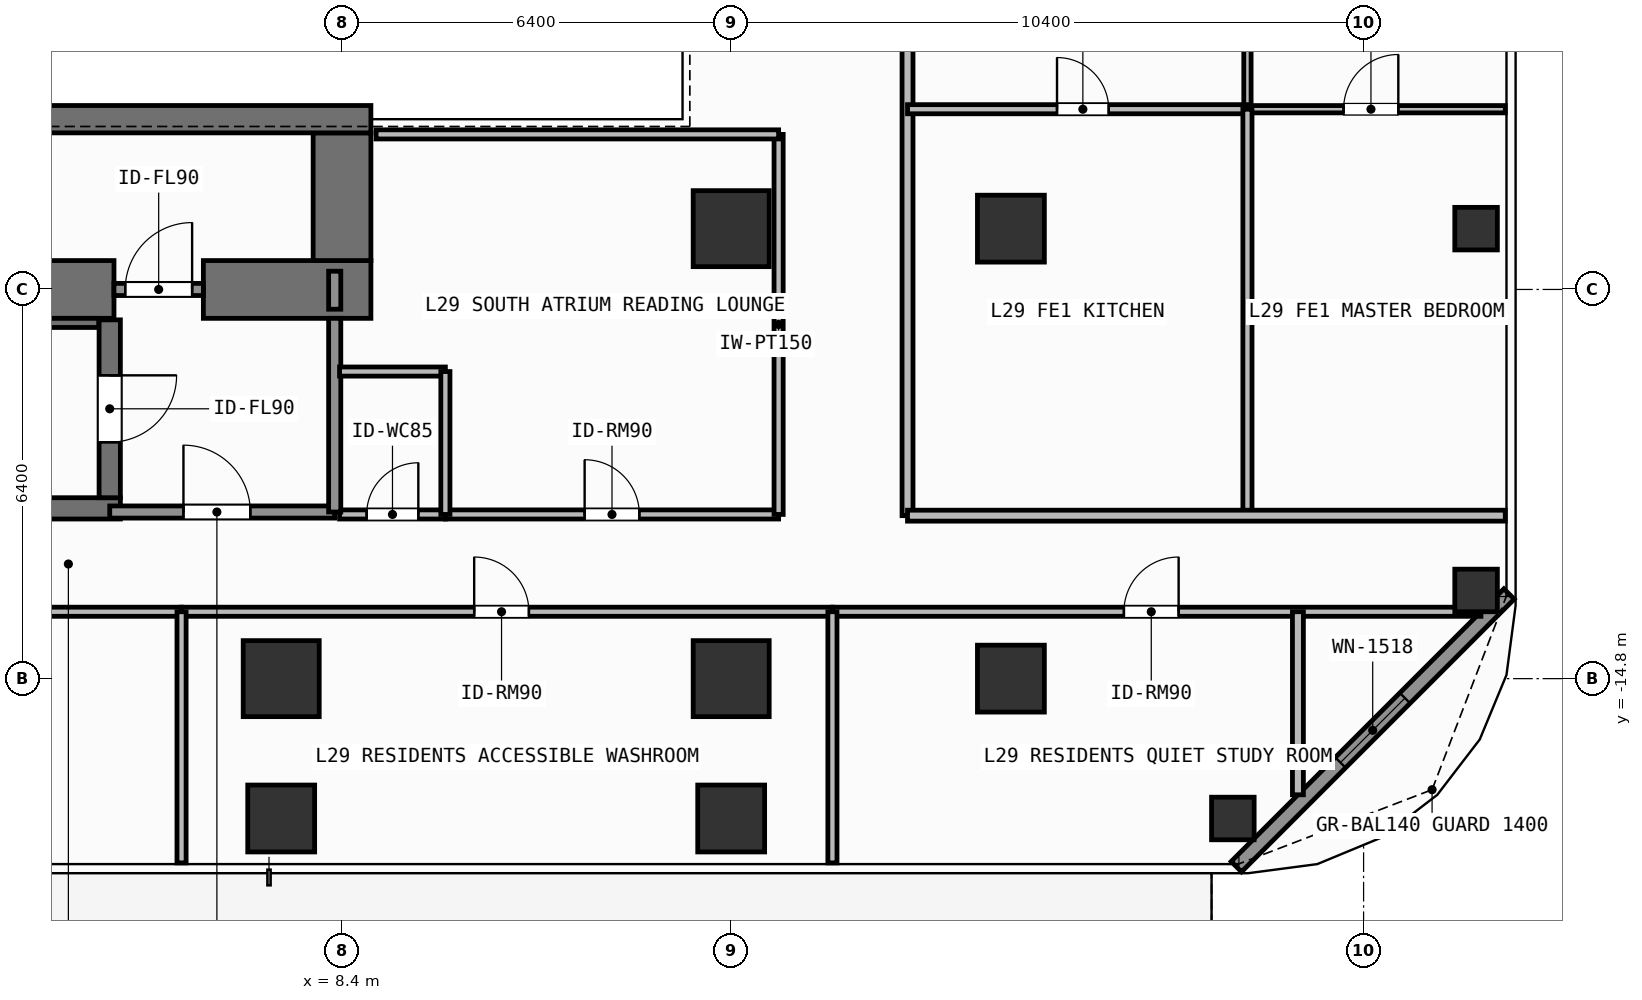
"""IFC4 building model, lengths in metres.
Left out: names, types, materials, properties, quantities, classifications, styles, units other than length and angle.
Written with IfcOpenShell. Run it as: python <this file> out.ifc"""

import sys

from ifc_helpers import new_model, si_unit, direction, frame, frame_2d, origin, origin_2d, place, context, subcontext, project, spatial, rectangle, hollow_rectangle, extrude, element, fill, save


model = new_model("IFC4")
c1 = context("Model", 3, precision=1e-05, world=origin(), true_north=direction((0.0, 1.0)))
c2 = subcontext(c1, "Body", "Model", "MODEL_VIEW")
j1 = project(units=[si_unit("LENGTHUNIT", "METRE"), si_unit("PLANEANGLEUNIT", "RADIAN")], contexts=[c1])
p1 = place(None, origin())
s1 = spatial("IfcSite", under=j1, at=p1, CompositionType="ELEMENT")
p2 = place(p1, origin())
s2 = spatial("IfcBuilding", under=s1, at=p2, CompositionType="ELEMENT")
p3 = place(p2, frame((0.0, 0.0, 117.3)))
s3 = spatial("IfcBuildingStorey", under=s2, at=p3, CompositionType="ELEMENT", Elevation=117.3)
p4 = place(p3, frame((-2.62, -8.4, 0.0), z_axis=(0.0, 0.0, 1.0), x_axis=(1.0, 0.0, 0.0)))
e1 = element("IfcWall", 1, at=p4, inside=s3, PredefinedType="SHEAR", context=c2, shape_type="SweptSolid", body=[
    extrude(rectangle(XDim=7.27, YDim=0.95, at=frame_2d((3.635, 0.0))), origin(), (0.0, 0.0, 1.0), 3.9),
])
p5 = place(p3, frame((6.12, -8.4, 0.0), z_axis=(0.0, 0.0, 1.0), x_axis=(1.0, 0.0, 0.0)))
e2 = element("IfcWall", 2, at=p5, inside=s3, PredefinedType="SHEAR", context=c2, shape_type="SweptSolid", body=[
    extrude(rectangle(XDim=2.755, YDim=0.95, at=frame_2d((1.377, 0.0))), origin(), (0.0, 0.0, 1.0), 3.9),
])
p6 = place(p3, frame((8.4, -7.925, 0.0), z_axis=(0.0, 0.0, 1.0), x_axis=(0.0, 1.0, 0.0)))
e3 = element("IfcWall", 3, at=p6, inside=s3, PredefinedType="SHEAR", context=c2, shape_type="SweptSolid", body=[
    extrude(rectangle(XDim=2.1, YDim=0.95, at=frame_2d((1.05, 0.0))), origin(), (0.0, 0.0, 1.0), 3.9),
])
p7 = place(p3, frame((3.045, -5.6, 0.0), z_axis=(0.0, 0.0, 1.0), x_axis=(1.0, 0.0, 0.0)))
e4 = element("IfcWall", 4, at=p7, inside=s3, PredefinedType="SHEAR", context=c2, shape_type="SweptSolid", body=[
    extrude(rectangle(XDim=5.83, YDim=0.45, at=frame_2d((2.915, 0.0))), origin(), (0.0, 0.0, 1.0), 3.9),
])
p8 = place(p3, frame((-2.555, -12.0, 0.0), z_axis=(0.0, 0.0, 1.0), x_axis=(1.0, 0.0, 0.0)))
e5 = element("IfcWall", 5, at=p8, inside=s3, PredefinedType="SHEAR", context=c2, shape_type="SweptSolid", body=[
    extrude(rectangle(XDim=7.31, YDim=0.35, at=frame_2d((3.655, 0.0))), origin(), (0.0, 0.0, 1.0), 3.9),
])
p9 = place(p3, frame((-2.2, -8.95, 0.0), z_axis=(0.0, 0.0, 1.0), x_axis=(1.0, 0.0, 0.0)))
e6 = element("IfcWall", 6, at=p9, inside=s3, PredefinedType="SHEAR", context=c2, shape_type="SweptSolid", body=[
    extrude(rectangle(XDim=6.6, YDim=0.15, at=frame_2d((3.3, 0.0))), origin(), (0.0, 0.0, 1.0), 3.9),
])
p10 = place(p3, frame((4.58, -8.9, 0.0), z_axis=(0.0, 0.0, 1.0), x_axis=(0.0, -1.0, 0.0)))
e7 = element("IfcWall", 7, at=p10, inside=s3, PredefinedType="SHEAR", context=c2, shape_type="SweptSolid", body=[
    extrude(rectangle(XDim=2.925, YDim=0.35, at=frame_2d((1.462, 0.0))), origin(), (0.0, 0.0, 1.0), 3.9),
])
p11 = place(p10, frame((0.913, 0.0, 0.0)))
e8 = element("IfcOpeningElement", 8, at=p11, cuts=e7, PredefinedType="OPENING", context=c2, shape_type="SweptSolid", body=[
    extrude(rectangle(XDim=1.1, YDim=2.15, at=frame_2d((0.55, 1.075))), frame((0.0, 0.185, 0.0), z_axis=(0.0, -1.0, 0.0), x_axis=(1.0, 0.0, 0.0)), (0.0, 0.0, 1.0), 0.37),
])
for number, where, z_axis, x_axis in (
    (9, (7.4, -14.8, 0.0), (0.0, 0.0, 1.0), (1.0, 0.0, 0.0)),
    (10, (14.8, -14.8, 0.0), (0.0, 0.0, 1.0), (1.0, 0.0, 0.0)),
    (11, (14.8, -7.4, 0.0), (0.0, 0.0, 1.0), (1.0, 0.0, 0.0)),
):
    element("IfcColumn", number, at=place(p3, frame(where, z_axis=z_axis, x_axis=x_axis)), inside=s3, PredefinedType="COLUMN", context=c2, shape_type="SweptSolid", body=[
        extrude(rectangle(XDim=1.25, YDim=1.25, at=origin_2d()), origin(), (0.0, 0.0, 1.0), 3.9),
    ])
for number, where, z_axis, x_axis in (
    (12, (19.4, -14.8, 0.0), (0.0, 0.0, 1.0), (1.0, 0.0, 0.0)),
    (13, (19.4, -7.4, 0.0), (0.0, 0.0, 1.0), (1.0, 0.0, 0.0)),
    (14, (7.4, -17.1, 0.0), (0.0, 0.0, 1.0), (1.0, 0.0, 0.0)),
    (15, (14.8, -17.1, 0.0), (0.0, 0.0, 1.0), (1.0, 0.0, 0.0)),
):
    element("IfcColumn", number, at=place(p3, frame(where, z_axis=z_axis, x_axis=x_axis)), inside=s3, PredefinedType="COLUMN", context=c2, shape_type="SweptSolid", body=[
        extrude(rectangle(XDim=1.1, YDim=1.1, at=origin_2d()), origin(), (0.0, 0.0, 1.0), 3.9),
    ])
for number, where, z_axis, x_axis in (
    (16, (23.05, -17.1, 0.0), (0.0, 0.0, 1.0), (1.0, 0.0, 0.0)),
    (17, (27.05, -13.35, 0.0), (0.0, 0.0, 1.0), (1.0, 0.0, 0.0)),
    (18, (27.05, -7.4, 0.0), (0.0, 0.0, 1.0), (1.0, 0.0, 0.0)),
):
    element("IfcColumn", number, at=place(p3, frame(where, z_axis=z_axis, x_axis=x_axis)), inside=s3, PredefinedType="COLUMN", context=c2, shape_type="SweptSolid", body=[
        extrude(hollow_rectangle(XDim=0.7, YDim=0.7, WallThickness=0.032, at=origin_2d()), origin(), (0.0, 0.0, 1.0), 3.9),
    ])
p12 = place(p3, frame((27.592, -13.408, 0.0), z_axis=(0.0, 0.0, 1.0), x_axis=(-0.707106781187, -0.707106781187, 0.0)))
e19 = element("IfcWall", 19, at=p12, inside=s3, PredefinedType="SOLIDWALL", context=c2, shape_type="SweptSolid", body=[
    extrude(rectangle(XDim=6.342, YDim=0.24, at=frame_2d((3.171, 0.0))), origin(), (0.0, 0.0, 1.0), 3.68),
])
p13 = place(p12, frame((2.421, 0.0, 0.8)))
e20 = element("IfcOpeningElement", 20, at=p13, cuts=e19, PredefinedType="OPENING", context=c2, shape_type="SweptSolid", body=[
    extrude(rectangle(XDim=1.5, YDim=1.85, at=frame_2d((0.75, 0.925))), frame((0.0, 0.13, 0.0), z_axis=(0.0, -1.0, 0.0), x_axis=(1.0, 0.0, 0.0)), (0.0, 0.0, 1.0), 0.26),
])
p14 = place(p3, frame((4.58, -12.06, 0.0), z_axis=(0.0, 0.0, 1.0), x_axis=(1.0, 0.0, 0.0)))
e21 = element("IfcWall", 21, at=p14, inside=s3, PredefinedType="SOLIDWALL", context=c2, shape_type="SweptSolid", body=[
    extrude(rectangle(XDim=3.7, YDim=0.2, at=frame_2d((1.85, 0.0))), origin(), (0.0, 0.0, 1.0), 3.68),
])
p15 = place(p14, frame((1.212, 0.0, 0.0)))
e22 = element("IfcOpeningElement", 22, at=p15, cuts=e21, PredefinedType="OPENING", context=c2, shape_type="SweptSolid", body=[
    extrude(rectangle(XDim=1.1, YDim=2.15, at=frame_2d((0.55, 1.075))), frame((0.0, 0.11, 0.0), z_axis=(0.0, -1.0, 0.0), x_axis=(1.0, 0.0, 0.0)), (0.0, 0.0, 1.0), 0.22),
])
p16 = place(p3, frame((4.65, -8.4, 0.0), z_axis=(0.0, 0.0, 1.0), x_axis=(1.0, 0.0, 0.0)))
e23 = element("IfcWall", 23, at=p16, inside=s3, PredefinedType="SOLIDWALL", context=c2, shape_type="SweptSolid", body=[
    extrude(rectangle(XDim=1.47, YDim=0.2, at=frame_2d((0.735, 0.0))), origin(), (0.0, 0.0, 1.0), 2.72),
])
p17 = place(p16, frame((0.185, 0.0, 0.0)))
e24 = element("IfcOpeningElement", 24, at=p17, cuts=e23, PredefinedType="OPENING", context=c2, shape_type="SweptSolid", body=[
    extrude(rectangle(XDim=1.1, YDim=2.15, at=frame_2d((0.55, 1.075))), frame((0.0, 0.11, 0.0), z_axis=(0.0, -1.0, 0.0), x_axis=(1.0, 0.0, 0.0)), (0.0, 0.0, 1.0), 0.22),
])
p18 = place(p3, frame((8.36, -12.1, 0.0), z_axis=(0.0, 0.0, 1.0), x_axis=(1.0, 0.0, 0.0)))
e25 = element("IfcWall", 25, at=p18, inside=s3, PredefinedType="PARTITIONING", context=c2, shape_type="SweptSolid", body=[
    extrude(rectangle(XDim=1.74, YDim=0.15, at=frame_2d((0.87, 0.0))), origin(), (0.0, 0.0, 1.0), 3.68),
])
p19 = place(p18, frame((0.445, 0.0, 0.0)))
e26 = element("IfcOpeningElement", 26, at=p19, cuts=e25, PredefinedType="OPENING", context=c2, shape_type="SweptSolid", body=[
    extrude(rectangle(XDim=0.85, YDim=2.1, at=frame_2d((0.425, 1.05))), frame((0.0, 0.085, 0.0), z_axis=(0.0, -1.0, 0.0), x_axis=(1.0, 0.0, 0.0)), (0.0, 0.0, 1.0), 0.17),
])
p20 = place(p3, frame((10.1, -12.1, 0.0), z_axis=(0.0, 0.0, 1.0), x_axis=(1.0, 0.0, 0.0)))
e27 = element("IfcWall", 27, at=p20, inside=s3, PredefinedType="PARTITIONING", context=c2, shape_type="SweptSolid", body=[
    extrude(rectangle(XDim=5.48, YDim=0.15, at=frame_2d((2.74, 0.0))), origin(), (0.0, 0.0, 1.0), 3.68),
])
p21 = place(p20, frame((2.29, 0.0, 0.0)))
e28 = element("IfcOpeningElement", 28, at=p21, cuts=e27, PredefinedType="OPENING", context=c2, shape_type="SweptSolid", body=[
    extrude(rectangle(XDim=0.9, YDim=2.1, at=frame_2d((0.45, 1.05))), frame((0.0, 0.085, 0.0), z_axis=(0.0, -1.0, 0.0), x_axis=(1.0, 0.0, 0.0)), (0.0, 0.0, 1.0), 0.17),
])
p22 = place(p3, frame((-4.012, -13.7, 0.0), z_axis=(0.0, 0.0, 1.0), x_axis=(1.0, 0.0, 0.0)))
e29 = element("IfcWall", 29, at=p22, inside=s3, PredefinedType="PARTITIONING", context=c2, shape_type="SweptSolid", body=[
    extrude(rectangle(XDim=9.773, YDim=0.15, at=frame_2d((4.886, 0.0))), origin(), (0.0, 0.0, 1.0), 3.68),
])
p23 = place(p22, frame((4.793, 0.0, 0.0)))
e30 = element("IfcOpeningElement", 30, at=p23, cuts=e29, PredefinedType="OPENING", context=c2, shape_type="SweptSolid", body=[
    extrude(rectangle(XDim=0.9, YDim=2.1, at=frame_2d((0.45, 1.05))), frame((0.0, 0.085, 0.0), z_axis=(0.0, -1.0, 0.0), x_axis=(1.0, 0.0, 0.0)), (0.0, 0.0, 1.0), 0.17),
])
p24 = place(p3, frame((5.761, -13.7, 0.0), z_axis=(0.0, 0.0, 1.0), x_axis=(1.0, 0.0, 0.0)))
e31 = element("IfcWall", 31, at=p24, inside=s3, PredefinedType="PARTITIONING", context=c2, shape_type="SweptSolid", body=[
    extrude(rectangle(XDim=10.704, YDim=0.15, at=frame_2d((5.352, 0.0))), origin(), (0.0, 0.0, 1.0), 3.68),
])
p25 = place(p24, frame((4.812, 0.0, 0.0)))
e32 = element("IfcOpeningElement", 32, at=p25, cuts=e31, PredefinedType="OPENING", context=c2, shape_type="SweptSolid", body=[
    extrude(rectangle(XDim=0.9, YDim=2.1, at=frame_2d((0.45, 1.05))), frame((0.0, 0.085, 0.0), z_axis=(0.0, -1.0, 0.0), x_axis=(1.0, 0.0, 0.0)), (0.0, 0.0, 1.0), 0.17),
])
p26 = place(p3, frame((16.465, -13.7, 0.0), z_axis=(0.0, 0.0, 1.0), x_axis=(1.0, 0.0, 0.0)))
e33 = element("IfcWall", 33, at=p26, inside=s3, PredefinedType="PARTITIONING", context=c2, shape_type="SweptSolid", body=[
    extrude(rectangle(XDim=10.665, YDim=0.15, at=frame_2d((5.333, 0.0))), origin(), (0.0, 0.0, 1.0), 3.68),
])
p27 = place(p26, frame((4.793, 0.0, 0.0)))
e34 = element("IfcOpeningElement", 34, at=p27, cuts=e33, PredefinedType="OPENING", context=c2, shape_type="SweptSolid", body=[
    extrude(rectangle(XDim=0.9, YDim=2.1, at=frame_2d((0.45, 1.05))), frame((0.0, 0.085, 0.0), z_axis=(0.0, -1.0, 0.0), x_axis=(1.0, 0.0, 0.0)), (0.0, 0.0, 1.0), 0.17),
])
p28 = place(p3, frame((17.7, -12.12, 0.0), z_axis=(0.0, 0.0, 1.0), x_axis=(0.0, 1.0, 0.0)))
e35 = element("IfcWall", 35, at=p28, inside=s3, PredefinedType="PARTITIONING", context=c2, shape_type="SweptSolid", body=[
    extrude(rectangle(XDim=24.24, YDim=0.18, at=frame_2d((12.12, 0.0))), origin(), (0.0, 0.0, 1.0), 3.68),
])
p29 = place(p28, frame((11.62, 0.0, 0.0)))
e36 = element("IfcOpeningElement", 36, at=p29, cuts=e35, PredefinedType="OPENING", context=c2, shape_type="SweptSolid", body=[
    extrude(rectangle(XDim=1.0, YDim=2.2, at=frame_2d((0.5, 1.1))), frame((0.0, 0.1, 0.0), z_axis=(0.0, -1.0, 0.0), x_axis=(1.0, 0.0, 0.0)), (0.0, 0.0, 1.0), 0.2),
])
p30 = place(p3, frame((23.29, -5.436, 0.0), z_axis=(0.0, 0.0, 1.0), x_axis=(0.0, 1.0, 0.0)))
e37 = element("IfcWall", 37, at=p30, inside=s3, PredefinedType="PARTITIONING", context=c2, shape_type="SweptSolid", body=[
    extrude(rectangle(XDim=10.872, YDim=0.12, at=frame_2d((5.436, 0.0))), origin(), (0.0, 0.0, 1.0), 3.68),
])
p31 = place(p30, frame((4.986, 0.0, 0.0)))
e38 = element("IfcOpeningElement", 38, at=p31, cuts=e37, PredefinedType="OPENING", context=c2, shape_type="SweptSolid", body=[
    extrude(rectangle(XDim=0.9, YDim=2.1, at=frame_2d((0.45, 1.05))), frame((0.0, 0.07, 0.0), z_axis=(0.0, -1.0, 0.0), x_axis=(1.0, 0.0, 0.0)), (0.0, 0.0, 1.0), 0.14),
])
p32 = place(p3, frame((17.7, -5.436, 0.0), z_axis=(0.0, 0.0, 1.0), x_axis=(1.0, 0.0, 0.0)))
e39 = element("IfcWall", 39, at=p32, inside=s3, PredefinedType="PARTITIONING", context=c2, shape_type="SweptSolid", body=[
    extrude(rectangle(XDim=5.59, YDim=0.15, at=frame_2d((2.795, 0.0))), origin(), (0.0, 0.0, 1.0), 3.68),
])
p33 = place(p32, frame((2.458, 0.0, 0.0)))
e40 = element("IfcOpeningElement", 40, at=p33, cuts=e39, PredefinedType="OPENING", context=c2, shape_type="SweptSolid", body=[
    extrude(rectangle(XDim=0.85, YDim=2.1, at=frame_2d((0.425, 1.05))), frame((0.0, 0.085, 0.0), z_axis=(0.0, -1.0, 0.0), x_axis=(1.0, 0.0, 0.0)), (0.0, 0.0, 1.0), 0.17),
])
p34 = place(p3, frame((23.29, -5.436, 0.0), z_axis=(0.0, 0.0, 1.0), x_axis=(1.0, 0.0, 0.0)))
e41 = element("IfcWall", 41, at=p34, inside=s3, PredefinedType="PARTITIONING", context=c2, shape_type="SweptSolid", body=[
    extrude(rectangle(XDim=4.24, YDim=0.12, at=frame_2d((2.12, 0.0))), origin(), (0.0, 0.0, 1.0), 3.68),
])
p35 = place(p34, frame((1.581, 0.0, 0.0)))
e42 = element("IfcOpeningElement", 42, at=p35, cuts=e41, PredefinedType="OPENING", context=c2, shape_type="SweptSolid", body=[
    extrude(rectangle(XDim=0.9, YDim=2.1, at=frame_2d((0.45, 1.05))), frame((0.0, 0.07, 0.0), z_axis=(0.0, -1.0, 0.0), x_axis=(1.0, 0.0, 0.0)), (0.0, 0.0, 1.0), 0.14),
])
p36 = place(p3, frame((8.28, -12.06, 0.0), z_axis=(0.0, 0.0, 1.0), x_axis=(0.0, 1.0, 0.0)))
e43 = element("IfcWall", 43, at=p36, inside=s3, PredefinedType="SOLIDWALL", context=c2, shape_type="SweptSolid", body=[
    extrude(rectangle(XDim=3.185, YDim=0.2, at=frame_2d((1.593, 0.0))), origin(), (0.0, 0.0, 1.0), 3.68),
])
p37 = place(p3, frame((8.28, -8.725, 0.0), z_axis=(0.0, 0.0, 1.0), x_axis=(0.0, 1.0, 0.0)))
e44 = element("IfcWall", 44, at=p37, inside=s3, PredefinedType="SOLIDWALL", context=c2, shape_type="SweptSolid", body=[
    extrude(rectangle(XDim=0.625, YDim=0.2, at=frame_2d((0.312, 0.0))), origin(), (0.0, 0.0, 1.0), 3.68),
])
p38 = place(p3, frame((8.36, -9.75, 0.0), z_axis=(0.0, 0.0, 1.0), x_axis=(1.0, 0.0, 0.0)))
e45 = element("IfcWall", 45, at=p38, inside=s3, PredefinedType="PARTITIONING", context=c2, shape_type="SweptSolid", body=[
    extrude(rectangle(XDim=1.74, YDim=0.15, at=frame_2d((0.87, 0.0))), origin(), (0.0, 0.0, 1.0), 3.68),
])
p39 = place(p3, frame((10.1, -12.1, 0.0), z_axis=(0.0, 0.0, 1.0), x_axis=(0.0, 1.0, 0.0)))
e46 = element("IfcWall", 46, at=p39, inside=s3, PredefinedType="PARTITIONING", context=c2, shape_type="SweptSolid", body=[
    extrude(rectangle(XDim=2.35, YDim=0.15, at=frame_2d((1.175, 0.0))), origin(), (0.0, 0.0, 1.0), 3.68),
])
p40 = place(p3, frame((15.58, -12.1, 0.0), z_axis=(0.0, 0.0, 1.0), x_axis=(0.0, 1.0, 0.0)))
e47 = element("IfcWall", 47, at=p40, inside=s3, PredefinedType="PARTITIONING", context=c2, shape_type="SweptSolid", body=[
    extrude(rectangle(XDim=6.25, YDim=0.15, at=frame_2d((3.125, 0.0))), origin(), (0.0, 0.0, 1.0), 3.68),
])
p41 = place(p3, frame((8.96, -5.85, 0.0), z_axis=(0.0, 0.0, 1.0), x_axis=(1.0, 0.0, 0.0)))
e48 = element("IfcWall", 48, at=p41, inside=s3, PredefinedType="PARTITIONING", context=c2, shape_type="SweptSolid", body=[
    extrude(rectangle(XDim=6.62, YDim=0.15, at=frame_2d((3.31, 0.0))), origin(), (0.0, 0.0, 1.0), 3.68),
])
p42 = place(p3, frame((24.12, -16.71, 0.0), z_axis=(0.0, 0.0, 1.0), x_axis=(0.0, 1.0, 0.0)))
e49 = element("IfcWall", 49, at=p42, inside=s3, PredefinedType="PARTITIONING", context=c2, shape_type="SweptSolid", body=[
    extrude(rectangle(XDim=3.01, YDim=0.18, at=frame_2d((1.505, 0.0))), origin(), (0.0, 0.0, 1.0), 3.68),
])
for number, where, z_axis, x_axis in (
    (50, (5.761, -17.83, 0.0), (0.0, 0.0, 1.0), (0.0, 1.0, 0.0)),
    (51, (16.465, -17.83, 0.0), (0.0, 0.0, 1.0), (0.0, 1.0, 0.0)),
):
    element("IfcWall", number, at=place(p3, frame(where, z_axis=z_axis, x_axis=x_axis)), inside=s3, PredefinedType="PARTITIONING", context=c2, shape_type="SweptSolid", body=[
        extrude(rectangle(XDim=4.13, YDim=0.15, at=frame_2d((2.065, 0.0))), origin(), (0.0, 0.0, 1.0), 3.68),
    ])
p43 = place(p3, frame((23.29, -12.12, 0.0), z_axis=(0.0, 0.0, 1.0), x_axis=(0.0, 1.0, 0.0)))
e52 = element("IfcWall", 52, at=p43, inside=s3, PredefinedType="PARTITIONING", context=c2, shape_type="SweptSolid", body=[
    extrude(rectangle(XDim=6.684, YDim=0.15, at=frame_2d((3.342, 0.0))), origin(), (0.0, 0.0, 1.0), 3.68),
])
p44 = place(p3, frame((17.7, -12.12, 0.0), z_axis=(0.0, 0.0, 1.0), x_axis=(1.0, 0.0, 0.0)))
e53 = element("IfcWall", 53, at=p44, inside=s3, PredefinedType="PARTITIONING", context=c2, shape_type="SweptSolid", body=[
    extrude(rectangle(XDim=9.83, YDim=0.18, at=frame_2d((4.915, 0.0))), origin(), (0.0, 0.0, 1.0), 3.68),
])
p45 = place(p13, origin())
e54 = element("IfcWindow", 54, at=p45, inside=s3, PartitioningType="SINGLE_PANEL", PredefinedType="WINDOW", context=c2, shape_type="SweptSolid", body=[
    extrude(rectangle(XDim=1.5, YDim=1.85, at=frame_2d((0.75, 0.925))), frame((0.0, 0.03, 0.0), z_axis=(0.0, -1.0, 0.0), x_axis=(1.0, 0.0, 0.0)), (0.0, 0.0, 1.0), 0.06),
])
fill(e20, e54)
p46 = place(p11, origin())
e55 = element("IfcDoor", 55, at=p46, inside=s3, OperationType="SINGLE_SWING_LEFT", PredefinedType="DOOR", context=c2, shape_type="SweptSolid", body=[
    extrude(rectangle(XDim=1.1, YDim=2.15, at=frame_2d((0.55, 1.075))), frame((0.0, 0.025, 0.0), z_axis=(0.0, -1.0, 0.0), x_axis=(1.0, 0.0, 0.0)), (0.0, 0.0, 1.0), 0.05),
])
fill(e8, e55)
p47 = place(p15, origin())
e56 = element("IfcDoor", 56, at=p47, inside=s3, OperationType="SINGLE_SWING_LEFT", PredefinedType="DOOR", context=c2, shape_type="SweptSolid", body=[
    extrude(rectangle(XDim=1.1, YDim=2.15, at=frame_2d((0.55, 1.075))), frame((0.0, 0.025, 0.0), z_axis=(0.0, -1.0, 0.0), x_axis=(1.0, 0.0, 0.0)), (0.0, 0.0, 1.0), 0.05),
])
fill(e22, e56)
p48 = place(p17, origin())
e57 = element("IfcDoor", 57, at=p48, inside=s3, OperationType="SINGLE_SWING_RIGHT", PredefinedType="DOOR", context=c2, shape_type="SweptSolid", body=[
    extrude(rectangle(XDim=1.1, YDim=2.15, at=frame_2d((0.55, 1.075))), frame((0.0, 0.025, 0.0), z_axis=(0.0, -1.0, 0.0), x_axis=(1.0, 0.0, 0.0)), (0.0, 0.0, 1.0), 0.05),
])
fill(e24, e57)
p49 = place(p19, origin())
e58 = element("IfcDoor", 58, at=p49, inside=s3, OperationType="SINGLE_SWING_RIGHT", PredefinedType="DOOR", context=c2, shape_type="SweptSolid", body=[
    extrude(rectangle(XDim=0.85, YDim=2.1, at=frame_2d((0.425, 1.05))), frame((0.0, 0.025, 0.0), z_axis=(0.0, -1.0, 0.0), x_axis=(1.0, 0.0, 0.0)), (0.0, 0.0, 1.0), 0.05),
])
fill(e26, e58)
p50 = place(p21, origin())
e59 = element("IfcDoor", 59, at=p50, inside=s3, OperationType="SINGLE_SWING_LEFT", PredefinedType="DOOR", context=c2, shape_type="SweptSolid", body=[
    extrude(rectangle(XDim=0.9, YDim=2.1, at=frame_2d((0.45, 1.05))), frame((0.0, 0.025, 0.0), z_axis=(0.0, -1.0, 0.0), x_axis=(1.0, 0.0, 0.0)), (0.0, 0.0, 1.0), 0.05),
])
fill(e28, e59)
p51 = place(p25, origin())
e60 = element("IfcDoor", 60, at=p51, inside=s3, OperationType="SINGLE_SWING_LEFT", PredefinedType="DOOR", context=c2, shape_type="SweptSolid", body=[
    extrude(rectangle(XDim=0.9, YDim=2.1, at=frame_2d((0.45, 1.05))), frame((0.0, 0.025, 0.0), z_axis=(0.0, -1.0, 0.0), x_axis=(1.0, 0.0, 0.0)), (0.0, 0.0, 1.0), 0.05),
])
fill(e32, e60)
p52 = place(p27, origin())
e61 = element("IfcDoor", 61, at=p52, inside=s3, OperationType="SINGLE_SWING_RIGHT", PredefinedType="DOOR", context=c2, shape_type="SweptSolid", body=[
    extrude(rectangle(XDim=0.9, YDim=2.1, at=frame_2d((0.45, 1.05))), frame((0.0, 0.025, 0.0), z_axis=(0.0, -1.0, 0.0), x_axis=(1.0, 0.0, 0.0)), (0.0, 0.0, 1.0), 0.05),
])
fill(e34, e61)
p53 = place(p33, origin())
e62 = element("IfcDoor", 62, at=p53, inside=s3, OperationType="SINGLE_SWING_LEFT", PredefinedType="DOOR", context=c2, shape_type="SweptSolid", body=[
    extrude(rectangle(XDim=0.85, YDim=2.1, at=frame_2d((0.425, 1.05))), frame((0.0, 0.025, 0.0), z_axis=(0.0, -1.0, 0.0), x_axis=(1.0, 0.0, 0.0)), (0.0, 0.0, 1.0), 0.05),
])
fill(e40, e62)
p54 = place(p35, origin())
e63 = element("IfcDoor", 63, at=p54, inside=s3, OperationType="SINGLE_SWING_RIGHT", PredefinedType="DOOR", context=c2, shape_type="SweptSolid", body=[
    extrude(rectangle(XDim=0.9, YDim=2.1, at=frame_2d((0.45, 1.05))), frame((0.0, 0.025, 0.0), z_axis=(0.0, -1.0, 0.0), x_axis=(1.0, 0.0, 0.0)), (0.0, 0.0, 1.0), 0.05),
])
fill(e42, e63)
save(model, sys.argv[1])
